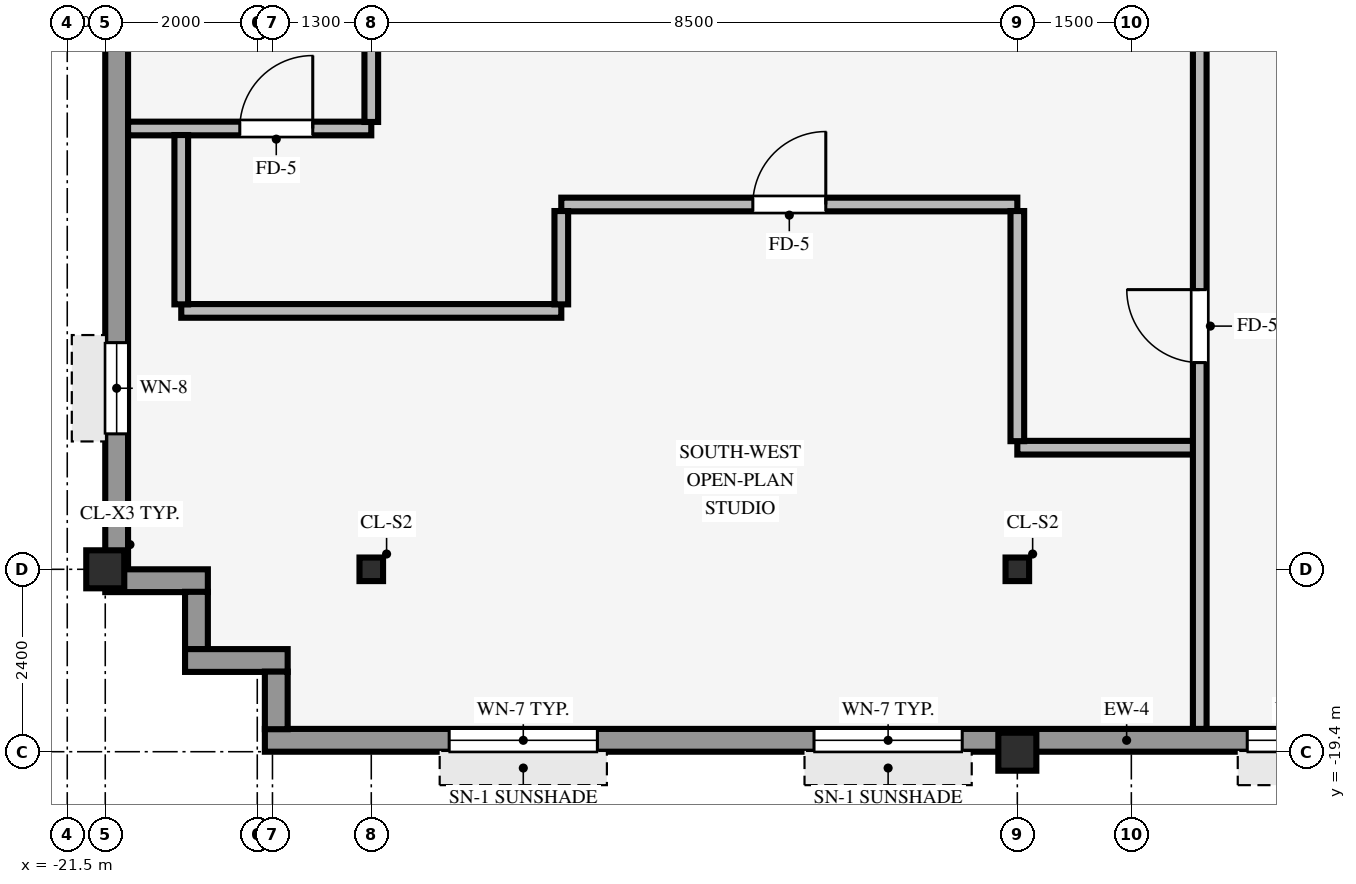
"""IFC4 building model, lengths in metres.
Left out: names, types, materials, properties, quantities, classifications, styles, units other than length and angle.
Written with IfcOpenShell. Run it as: python <this file> out.ifc"""

import sys

from ifc_helpers import new_model, si_unit, direction, frame, frame_2d, origin, origin_2d, place, context, subcontext, project, spatial, rectangle, hollow_rectangle, i_section, extrude, source, transform, mapped, element, fill, save


model = new_model("IFC4")
c1 = context("Model", 3, precision=1e-05, world=origin(), true_north=direction((0.0, 1.0)))
c2 = subcontext(c1, "Body", "Model", "MODEL_VIEW")
j1 = project(units=[si_unit("LENGTHUNIT", "METRE"), si_unit("PLANEANGLEUNIT", "RADIAN")], contexts=[c1])
p1 = place(None, origin())
s1 = spatial("IfcSite", under=j1, at=p1, CompositionType="ELEMENT")
p2 = place(p1, origin())
s2 = spatial("IfcBuilding", under=s1, at=p2, CompositionType="ELEMENT")
p3 = place(p2, frame((0.0, 0.0, 257.95)))
s3 = spatial("IfcBuildingStorey", under=s2, at=p3, CompositionType="ELEMENT", Elevation=257.95)
for number, where, z_axis, x_axis in (
    (1, (-21.0, -17.0, 0.0), (0.0, 0.0, 1.0), (1.0, 0.0, 0.0)),
    (2, (-9.0, -19.4, 0.0), (0.0, 0.0, 1.0), (1.0, 0.0, 0.0)),
):
    element("IfcColumn", number, at=place(p3, frame(where, z_axis=z_axis, x_axis=x_axis)), inside=s3, PredefinedType="COLUMN", context=c2, shape_type="SweptSolid", body=[
        extrude(hollow_rectangle(XDim=0.5, YDim=0.5, WallThickness=0.032, InnerFilletRadius=0.032, OuterFilletRadius=0.064, at=origin_2d()), origin(), (0.0, 0.0, 1.0), 3.37),
    ])
for number, where, z_axis, x_axis in (
    (3, (-17.5, -17.0, 0.0), (0.0, 0.0, 1.0), (1.0, 0.0, 0.0)),
    (4, (-9.0, -17.0, 0.0), (0.0, 0.0, 1.0), (1.0, 0.0, 0.0)),
):
    element("IfcColumn", number, at=place(p3, frame(where, z_axis=z_axis, x_axis=x_axis)), inside=s3, PredefinedType="COLUMN", context=c2, shape_type="SweptSolid", body=[
        extrude(i_section(OverallWidth=0.31, OverallDepth=0.31, WebThickness=0.015, FlangeThickness=0.015, FilletRadius=0.015, at=origin_2d()), origin(), (0.0, 0.0, 1.0), 3.37),
    ])
p4 = place(p3, frame((-18.9, -19.25, 0.0), z_axis=(0.0, 0.0, 1.0), x_axis=(1.0, 0.0, 0.0)))
e5 = element("IfcWall", 5, at=p4, inside=s3, PredefinedType="STANDARD", context=c2, shape_type="SweptSolid", body=[
    extrude(rectangle(XDim=35.6, YDim=0.3, at=frame_2d((17.8, 0.0))), origin(), (0.0, 0.0, 1.0), 2.705),
])
p5 = place(p4, frame((24.15, 0.0, 0.0), z_axis=(0.0, 0.0, 1.0), x_axis=(-1.0, 0.0, 0.0)))
e6 = element("IfcOpeningElement", 6, at=p5, cuts=e5, PredefinedType="OPENING", context=c2, shape_type="SweptSolid", body=[
    extrude(rectangle(XDim=1.05, YDim=2.1, at=frame_2d((0.525, 1.05))), frame((0.0, 0.16, 0.0), z_axis=(0.0, -1.0, 0.0), x_axis=(1.0, 0.0, 0.0)), (0.0, 0.0, 1.0), 0.32),
])
p6 = place(p4, frame((2.425, 0.0, 0.8)))
e7 = element("IfcOpeningElement", 7, at=p6, cuts=e5, PredefinedType="OPENING", context=c2, shape_type="SweptSolid", body=[
    extrude(rectangle(XDim=1.95, YDim=1.48, at=frame_2d((0.975, 0.74))), frame((0.0, 0.16, 0.0), z_axis=(0.0, -1.0, 0.0), x_axis=(1.0, 0.0, 0.0)), (0.0, 0.0, 1.0), 0.32),
])
p7 = place(p4, frame((7.225, 0.0, 0.8)))
e8 = element("IfcOpeningElement", 8, at=p7, cuts=e5, PredefinedType="OPENING", context=c2, shape_type="SweptSolid", body=[
    extrude(rectangle(XDim=1.95, YDim=1.48, at=frame_2d((0.975, 0.74))), frame((0.0, 0.16, 0.0), z_axis=(0.0, -1.0, 0.0), x_axis=(1.0, 0.0, 0.0)), (0.0, 0.0, 1.0), 0.32),
])
p8 = place(p4, frame((12.925, 0.0, 0.8)))
e9 = element("IfcOpeningElement", 9, at=p8, cuts=e5, PredefinedType="OPENING", context=c2, shape_type="SweptSolid", body=[
    extrude(rectangle(XDim=1.95, YDim=1.48, at=frame_2d((0.975, 0.74))), frame((0.0, 0.16, 0.0), z_axis=(0.0, -1.0, 0.0), x_axis=(1.0, 0.0, 0.0)), (0.0, 0.0, 1.0), 0.32),
])
p9 = place(p4, frame((15.475, 0.0, 0.8)))
e10 = element("IfcOpeningElement", 10, at=p9, cuts=e5, PredefinedType="OPENING", context=c2, shape_type="SweptSolid", body=[
    extrude(rectangle(XDim=1.95, YDim=1.48, at=frame_2d((0.975, 0.74))), frame((0.0, 0.16, 0.0), z_axis=(0.0, -1.0, 0.0), x_axis=(1.0, 0.0, 0.0)), (0.0, 0.0, 1.0), 0.32),
])
p10 = place(p4, frame((20.725, 0.0, 0.8)))
e11 = element("IfcOpeningElement", 11, at=p10, cuts=e5, PredefinedType="OPENING", context=c2, shape_type="SweptSolid", body=[
    extrude(rectangle(XDim=1.95, YDim=1.48, at=frame_2d((0.975, 0.74))), frame((0.0, 0.16, 0.0), z_axis=(0.0, -1.0, 0.0), x_axis=(1.0, 0.0, 0.0)), (0.0, 0.0, 1.0), 0.32),
])
p11 = place(p4, frame((31.225, 0.0, 0.8)))
e12 = element("IfcOpeningElement", 12, at=p11, cuts=e5, PredefinedType="OPENING", context=c2, shape_type="SweptSolid", body=[
    extrude(rectangle(XDim=1.95, YDim=1.48, at=frame_2d((0.975, 0.74))), frame((0.0, 0.16, 0.0), z_axis=(0.0, -1.0, 0.0), x_axis=(1.0, 0.0, 0.0)), (0.0, 0.0, 1.0), 0.32),
])
p12 = place(p3, frame((-20.85, -17.004, 0.0), z_axis=(0.0, 0.0, 1.0), x_axis=(0.0, 1.0, 0.0)))
e13 = element("IfcWall", 13, at=p12, inside=s3, PredefinedType="STANDARD", context=c2, shape_type="SweptSolid", body=[
    extrude(rectangle(XDim=34.008, YDim=0.3, at=frame_2d((17.004, 0.0))), origin(), (0.0, 0.0, 1.0), 2.705),
])
p13 = place(p12, frame((1.786, 0.0, 0.8)))
e14 = element("IfcOpeningElement", 14, at=p13, cuts=e13, PredefinedType="OPENING", context=c2, shape_type="SweptSolid", body=[
    extrude(rectangle(XDim=1.2, YDim=1.48, at=frame_2d((0.6, 0.74))), frame((0.0, 0.16, 0.0), z_axis=(0.0, -1.0, 0.0), x_axis=(1.0, 0.0, 0.0)), (0.0, 0.0, 1.0), 0.32),
])
p14 = place(p12, frame((8.159, 0.0, 0.8)))
e15 = element("IfcOpeningElement", 15, at=p14, cuts=e13, PredefinedType="OPENING", context=c2, shape_type="SweptSolid", body=[
    extrude(rectangle(XDim=1.2, YDim=1.48, at=frame_2d((0.6, 0.74))), frame((0.0, 0.16, 0.0), z_axis=(0.0, -1.0, 0.0), x_axis=(1.0, 0.0, 0.0)), (0.0, 0.0, 1.0), 0.32),
])
p15 = place(p12, frame((11.831, 0.0, 0.8)))
e16 = element("IfcOpeningElement", 16, at=p15, cuts=e13, PredefinedType="OPENING", context=c2, shape_type="SweptSolid", body=[
    extrude(rectangle(XDim=1.2, YDim=1.48, at=frame_2d((0.6, 0.74))), frame((0.0, 0.16, 0.0), z_axis=(0.0, -1.0, 0.0), x_axis=(1.0, 0.0, 0.0)), (0.0, 0.0, 1.0), 0.32),
])
p16 = place(p12, frame((17.754, 0.0, 0.8)))
e17 = element("IfcOpeningElement", 17, at=p16, cuts=e13, PredefinedType="OPENING", context=c2, shape_type="SweptSolid", body=[
    extrude(rectangle(XDim=1.2, YDim=1.48, at=frame_2d((0.6, 0.74))), frame((0.0, 0.16, 0.0), z_axis=(0.0, -1.0, 0.0), x_axis=(1.0, 0.0, 0.0)), (0.0, 0.0, 1.0), 0.32),
])
p17 = place(p12, frame((20.977, 0.0, 0.8)))
e18 = element("IfcOpeningElement", 18, at=p17, cuts=e13, PredefinedType="OPENING", context=c2, shape_type="SweptSolid", body=[
    extrude(rectangle(XDim=1.2, YDim=1.48, at=frame_2d((0.6, 0.74))), frame((0.0, 0.16, 0.0), z_axis=(0.0, -1.0, 0.0), x_axis=(1.0, 0.0, 0.0)), (0.0, 0.0, 1.0), 0.32),
])
p18 = place(p12, frame((24.649, 0.0, 0.8)))
e19 = element("IfcOpeningElement", 19, at=p18, cuts=e13, PredefinedType="OPENING", context=c2, shape_type="SweptSolid", body=[
    extrude(rectangle(XDim=1.2, YDim=1.48, at=frame_2d((0.6, 0.74))), frame((0.0, 0.16, 0.0), z_axis=(0.0, -1.0, 0.0), x_axis=(1.0, 0.0, 0.0)), (0.0, 0.0, 1.0), 0.32),
])
p19 = place(p12, frame((31.022, 0.0, 0.8)))
e20 = element("IfcOpeningElement", 20, at=p19, cuts=e13, PredefinedType="OPENING", context=c2, shape_type="SweptSolid", body=[
    extrude(rectangle(XDim=1.2, YDim=1.48, at=frame_2d((0.6, 0.74))), frame((0.0, 0.16, 0.0), z_axis=(0.0, -1.0, 0.0), x_axis=(1.0, 0.0, 0.0)), (0.0, 0.0, 1.0), 0.32),
])
p20 = place(p3, frame((-21.0, -17.15, 0.0), z_axis=(0.0, 0.0, 1.0), x_axis=(1.0, 0.0, 0.0)))
e21 = element("IfcWall", 21, at=p20, inside=s3, PredefinedType="STANDARD", context=c2, shape_type="SweptSolid", body=[
    extrude(rectangle(XDim=1.35, YDim=0.3, at=frame_2d((0.675, 0.0))), origin(), (0.0, 0.0, 1.0), 2.892),
])
p21 = place(p3, frame((-19.8, -18.054, 0.0), z_axis=(0.0, 0.0, 1.0), x_axis=(0.0, 1.0, 0.0)))
e22 = element("IfcWall", 22, at=p21, inside=s3, PredefinedType="STANDARD", context=c2, shape_type="SweptSolid", body=[
    extrude(rectangle(XDim=0.758, YDim=0.3, at=frame_2d((0.379, 0.0))), origin(), (0.0, 0.0, 1.0), 2.892),
])
p22 = place(p3, frame((-19.95, -18.2, 0.0), z_axis=(0.0, 0.0, 1.0), x_axis=(1.0, 0.0, 0.0)))
e23 = element("IfcWall", 23, at=p22, inside=s3, PredefinedType="STANDARD", context=c2, shape_type="SweptSolid", body=[
    extrude(rectangle(XDim=1.35, YDim=0.3, at=frame_2d((0.675, 0.0))), origin(), (0.0, 0.0, 1.0), 2.892),
])
p23 = place(p3, frame((-18.75, -19.104, 0.0), z_axis=(0.0, 0.0, 1.0), x_axis=(0.0, 1.0, 0.0)))
e24 = element("IfcWall", 24, at=p23, inside=s3, PredefinedType="STANDARD", context=c2, shape_type="SweptSolid", body=[
    extrude(rectangle(XDim=0.758, YDim=0.3, at=frame_2d((0.379, 0.0))), origin(), (0.0, 0.0, 1.0), 2.892),
])
p24 = place(p3, frame((-9.0, -15.4, 0.0), z_axis=(0.0, 0.0, 1.0), x_axis=(1.0, 0.0, 0.0)))
e25 = element("IfcWall", 25, at=p24, inside=s3, PredefinedType="PARTITIONING", context=c2, shape_type="SweptSolid", body=[
    extrude(rectangle(XDim=2.324, YDim=0.18, at=frame_2d((1.162, 0.0))), origin(), (0.0, 0.0, 1.0), 3.36),
])
p25 = place(p3, frame((-20.0, -13.6, 0.0), z_axis=(0.0, 0.0, 1.0), x_axis=(1.0, 0.0, 0.0)))
e26 = element("IfcWall", 26, at=p25, inside=s3, PredefinedType="PARTITIONING", context=c2, shape_type="SweptSolid", body=[
    extrude(rectangle(XDim=5.0, YDim=0.18, at=frame_2d((2.5, 0.0))), origin(), (0.0, 0.0, 1.0), 3.038),
])
p26 = place(p3, frame((-15.0, -12.2, 0.0), z_axis=(0.0, 0.0, 1.0), x_axis=(1.0, 0.0, 0.0)))
e27 = element("IfcWall", 27, at=p26, inside=s3, PredefinedType="PARTITIONING", context=c2, shape_type="SweptSolid", body=[
    extrude(rectangle(XDim=6.0, YDim=0.18, at=frame_2d((3.0, 0.0))), origin(), (0.0, 0.0, 1.0), 3.36),
])
p27 = place(p26, frame((2.52, 0.0, 0.0)))
e28 = element("IfcOpeningElement", 28, at=p27, cuts=e27, PredefinedType="OPENING", context=c2, shape_type="SweptSolid", body=[
    extrude(rectangle(XDim=0.96, YDim=2.1, at=frame_2d((0.48, 1.05))), frame((0.0, 0.1, 0.0), z_axis=(0.0, -1.0, 0.0), x_axis=(1.0, 0.0, 0.0)), (0.0, 0.0, 1.0), 0.2),
])
p28 = place(p3, frame((-20.7, -11.2, 0.0), z_axis=(0.0, 0.0, 1.0), x_axis=(1.0, 0.0, 0.0)))
e29 = element("IfcWall", 29, at=p28, inside=s3, PredefinedType="PARTITIONING", context=c2, shape_type="SweptSolid", body=[
    extrude(rectangle(XDim=3.2, YDim=0.18, at=frame_2d((1.6, 0.0))), origin(), (0.0, 0.0, 1.0), 3.36),
])
p29 = place(p28, frame((1.47, 0.0, 0.0)))
e30 = element("IfcOpeningElement", 30, at=p29, cuts=e29, PredefinedType="OPENING", context=c2, shape_type="SweptSolid", body=[
    extrude(rectangle(XDim=0.96, YDim=2.1, at=frame_2d((0.48, 1.05))), frame((0.0, 0.1, 0.0), z_axis=(0.0, -1.0, 0.0), x_axis=(1.0, 0.0, 0.0)), (0.0, 0.0, 1.0), 0.2),
])
p30 = place(p3, frame((-20.0, -13.514, 0.0), z_axis=(0.0, 0.0, 1.0), x_axis=(0.0, 1.0, 0.0)))
e31 = element("IfcWall", 31, at=p30, inside=s3, PredefinedType="PARTITIONING", context=c2, shape_type="SweptSolid", body=[
    extrude(rectangle(XDim=2.228, YDim=0.18, at=frame_2d((1.114, 0.0))), origin(), (0.0, 0.0, 1.0), 3.36),
])
p31 = place(p3, frame((-17.5, -11.114, 0.0), z_axis=(0.0, 0.0, 1.0), x_axis=(0.0, 1.0, 0.0)))
e32 = element("IfcWall", 32, at=p31, inside=s3, PredefinedType="PARTITIONING", context=c2, shape_type="SweptSolid", body=[
    extrude(rectangle(XDim=1.118, YDim=0.18, at=frame_2d((0.559, 0.0))), origin(), (0.0, 0.0, 1.0), 2.892),
])
p32 = place(p3, frame((-15.0, -13.514, 0.0), z_axis=(0.0, 0.0, 1.0), x_axis=(0.0, 1.0, 0.0)))
e33 = element("IfcWall", 33, at=p32, inside=s3, PredefinedType="PARTITIONING", context=c2, shape_type="SweptSolid", body=[
    extrude(rectangle(XDim=1.228, YDim=0.18, at=frame_2d((0.614, 0.0))), origin(), (0.0, 0.0, 1.0), 3.36),
])
p33 = place(p3, frame((-9.0, -15.314, 0.0), z_axis=(0.0, 0.0, 1.0), x_axis=(0.0, 1.0, 0.0)))
e34 = element("IfcWall", 34, at=p33, inside=s3, PredefinedType="PARTITIONING", context=c2, shape_type="SweptSolid", body=[
    extrude(rectangle(XDim=3.028, YDim=0.18, at=frame_2d((1.514, 0.0))), origin(), (0.0, 0.0, 1.0), 2.892),
])
p34 = place(p3, frame((-6.6, -19.1, 0.0), z_axis=(0.0, 0.0, 1.0), x_axis=(0.0, 1.0, 0.0)))
e35 = element("IfcWall", 35, at=p34, inside=s3, PredefinedType="PARTITIONING", context=c2, shape_type="SweptSolid", body=[
    extrude(rectangle(XDim=17.764, YDim=0.18, at=frame_2d((8.882, 0.0))), origin(), (0.0, 0.0, 1.0), 3.36),
])
p35 = place(p34, frame((13.152, 0.0, 0.0)))
e36 = element("IfcOpeningElement", 36, at=p35, cuts=e35, PredefinedType="OPENING", context=c2, shape_type="SweptSolid", body=[
    extrude(rectangle(XDim=0.96, YDim=2.1, at=frame_2d((0.48, 1.05))), frame((0.0, 0.1, 0.0), z_axis=(0.0, -1.0, 0.0), x_axis=(1.0, 0.0, 0.0)), (0.0, 0.0, 1.0), 0.2),
])
p36 = place(p34, frame((4.82, 0.0, 0.0)))
e37 = element("IfcOpeningElement", 37, at=p36, cuts=e35, PredefinedType="OPENING", context=c2, shape_type="SweptSolid", body=[
    extrude(rectangle(XDim=0.96, YDim=2.1, at=frame_2d((0.48, 1.05))), frame((0.0, 0.1, 0.0), z_axis=(0.0, -1.0, 0.0), x_axis=(1.0, 0.0, 0.0)), (0.0, 0.0, 1.0), 0.2),
])
m1 = source(origin(), c2, "Body", "SweptSolid", [
    extrude(rectangle(XDim=1.95, YDim=1.48, at=frame_2d((0.975, 0.74))), frame((0.0, 0.03, 0.0), z_axis=(0.0, -1.0, 0.0), x_axis=(1.0, 0.0, 0.0)), (0.0, 0.0, 1.0), 0.06),
])
p37 = place(p6, origin())
e38 = element("IfcWindow", 38, at=p37, inside=s3, PartitioningType="SINGLE_PANEL", PredefinedType="WINDOW", context=c2, shape_type="MappedRepresentation", body=[
    mapped(m1, transform((0.0, 0.0, 0.0), scale=1.0)),
])
fill(e7, e38)
p38 = place(p7, origin())
e39 = element("IfcWindow", 39, at=p38, inside=s3, PartitioningType="SINGLE_PANEL", PredefinedType="WINDOW", context=c2, shape_type="MappedRepresentation", body=[
    mapped(m1, transform((0.0, 0.0, 0.0), scale=1.0)),
])
fill(e8, e39)
p39 = place(p8, origin())
e40 = element("IfcWindow", 40, at=p39, inside=s3, PartitioningType="SINGLE_PANEL", PredefinedType="WINDOW", context=c2, shape_type="MappedRepresentation", body=[
    mapped(m1, transform((0.0, 0.0, 0.0), scale=1.0)),
])
fill(e9, e40)
m2 = source(origin(), c2, "Body", "SweptSolid", [
    extrude(rectangle(XDim=1.2, YDim=1.48, at=frame_2d((0.6, 0.74))), frame((0.0, 0.03, 0.0), z_axis=(0.0, -1.0, 0.0), x_axis=(1.0, 0.0, 0.0)), (0.0, 0.0, 1.0), 0.06),
])
p40 = place(p13, origin())
e41 = element("IfcWindow", 41, at=p40, inside=s3, PartitioningType="SINGLE_PANEL", PredefinedType="WINDOW", context=c2, shape_type="MappedRepresentation", body=[
    mapped(m2, transform((0.0, 0.0, 0.0), scale=1.0)),
])
fill(e14, e41)
m3 = source(origin(), c2, "Body", "SweptSolid", [
    extrude(rectangle(XDim=0.96, YDim=2.1, at=frame_2d((0.48, 1.05))), frame((0.0, 0.025, 0.0), z_axis=(0.0, -1.0, 0.0), x_axis=(1.0, 0.0, 0.0)), (0.0, 0.0, 1.0), 0.05),
])
p41 = place(p27, origin())
e42 = element("IfcDoor", 42, at=p41, inside=s3, OperationType="SINGLE_SWING_RIGHT", PredefinedType="DOOR", context=c2, shape_type="MappedRepresentation", body=[
    mapped(m3, transform((0.0, 0.0, 0.0), scale=1.0)),
])
fill(e28, e42)
p42 = place(p36, origin())
e43 = element("IfcDoor", 43, at=p42, inside=s3, OperationType="SINGLE_SWING_RIGHT", PredefinedType="DOOR", context=c2, shape_type="MappedRepresentation", body=[
    mapped(m3, transform((0.0, 0.0, 0.0), scale=1.0)),
])
fill(e37, e43)
p43 = place(p29, origin())
e44 = element("IfcDoor", 44, at=p43, inside=s3, OperationType="SINGLE_SWING_RIGHT", PredefinedType="DOOR", context=c2, shape_type="MappedRepresentation", body=[
    mapped(m3, transform((0.0, 0.0, 0.0), scale=1.0)),
])
fill(e30, e44)
save(model, sys.argv[1])
